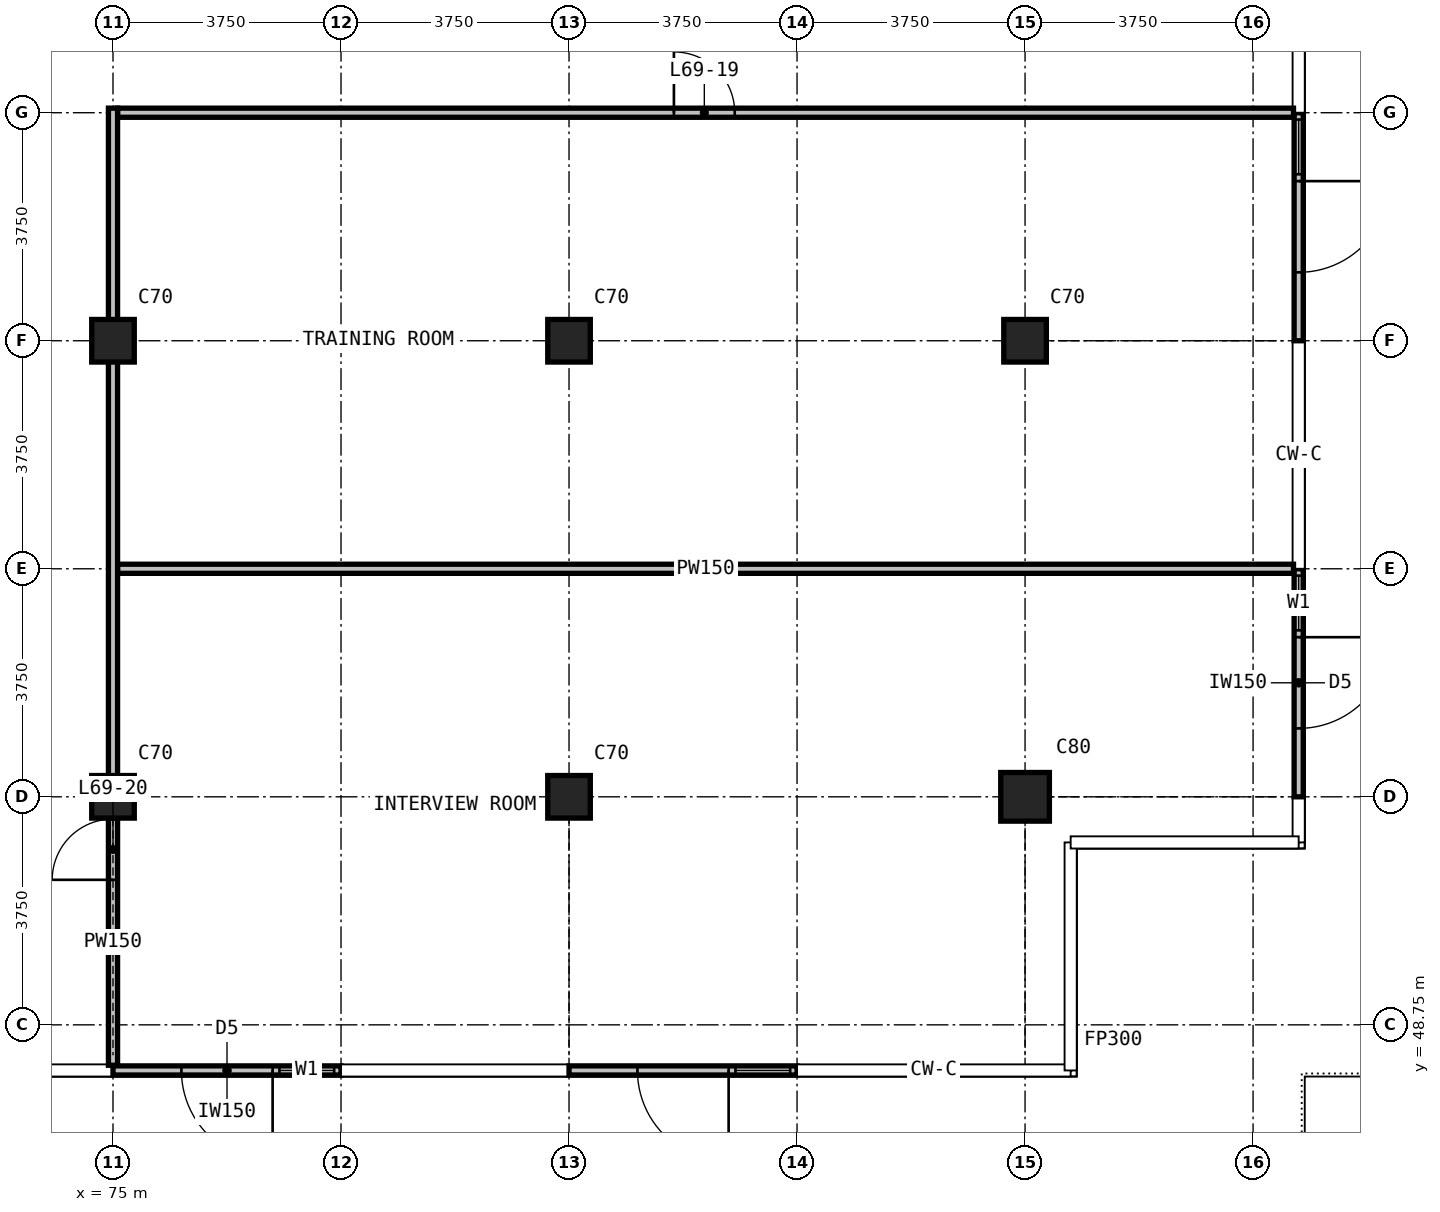
"""IFC4 building model, lengths in metres.
Left out: names, types, materials, properties, quantities, classifications, styles, units other than length and angle.
Written with IfcOpenShell. Run it as: python <this file> out.ifc"""

import sys

from ifc_helpers import new_model, si_unit, direction, frame, frame_2d, origin, origin_2d, place, context, subcontext, project, spatial, rectangle, extrude, element, fill, save


model = new_model("IFC4")
c1 = context("Model", 3, precision=1e-05, world=origin(), true_north=direction((0.0, 1.0)))
c2 = subcontext(c1, "Body", "Model", "MODEL_VIEW")
j1 = project(units=[si_unit("LENGTHUNIT", "METRE"), si_unit("PLANEANGLEUNIT", "RADIAN")], contexts=[c1])
p1 = place(None, origin())
s1 = spatial("IfcSite", under=j1, at=p1, CompositionType="ELEMENT")
p2 = place(p1, origin())
s2 = spatial("IfcBuilding", under=s1, at=p2, CompositionType="ELEMENT")
p3 = place(p2, frame((0.0, 0.0, 265.7)))
s3 = spatial("IfcBuildingStorey", under=s2, at=p3, CompositionType="ELEMENT", Elevation=265.7)
for number, where, z_axis, x_axis in (
    (1, (75.0, 52.5, 0.0), (0.0, 0.0, 1.0), (1.0, 0.0, 0.0)),
    (2, (75.0, 60.0, 0.0), (0.0, 0.0, 1.0), (1.0, 0.0, 0.0)),
    (3, (82.5, 52.5, 0.0), (0.0, 0.0, 1.0), (1.0, 0.0, 0.0)),
    (4, (82.5, 60.0, 0.0), (0.0, 0.0, 1.0), (1.0, 0.0, 0.0)),
):
    element("IfcColumn", number, at=place(p3, frame(where, z_axis=z_axis, x_axis=x_axis)), inside=s3, PredefinedType="COLUMN", context=c2, shape_type="SweptSolid", body=[
        extrude(rectangle(XDim=0.7, YDim=0.7, at=origin_2d()), origin(), (0.0, 0.0, 1.0), 3.6),
    ])
p4 = place(p3, frame((90.0, 52.5, 0.0), z_axis=(0.0, 0.0, 1.0), x_axis=(1.0, 0.0, 0.0)))
e5 = element("IfcColumn", 5, at=p4, inside=s3, PredefinedType="COLUMN", context=c2, shape_type="SweptSolid", body=[
    extrude(rectangle(XDim=0.8, YDim=0.8, at=origin_2d()), origin(), (0.0, 0.0, 1.0), 3.6),
])
p5 = place(p3, frame((90.0, 60.0, 0.0), z_axis=(0.0, 0.0, 1.0), x_axis=(1.0, 0.0, 0.0)))
e6 = element("IfcColumn", 6, at=p5, inside=s3, PredefinedType="COLUMN", context=c2, shape_type="SweptSolid", body=[
    extrude(rectangle(XDim=0.7, YDim=0.7, at=origin_2d()), origin(), (0.0, 0.0, 1.0), 3.6),
])
p6 = place(p3, frame((94.5, 56.25, 0.0), z_axis=(0.0, 0.0, 1.0), x_axis=(0.0, -1.0, 0.0)))
e7 = element("IfcWall", 7, at=p6, inside=s3, PredefinedType="SOLIDWALL", context=c2, shape_type="SweptSolid", body=[
    extrude(rectangle(XDim=3.75, YDim=0.15, at=frame_2d((1.875, 0.0))), origin(), (0.0, 0.0, 1.0), 3.3),
])
p7 = place(p6, frame((0.113, 0.0, 0.1)))
e8 = element("IfcOpeningElement", 8, at=p7, cuts=e7, PredefinedType="OPENING", context=c2, shape_type="SweptSolid", body=[
    extrude(rectangle(XDim=0.9, YDim=2.4, at=frame_2d((0.45, 1.2))), frame((0.0, 0.085, 0.0), z_axis=(0.0, -1.0, 0.0), x_axis=(1.0, 0.0, 0.0)), (0.0, 0.0, 1.0), 0.17),
])
p8 = place(p6, frame((1.125, 0.0, 0.0)))
e9 = element("IfcOpeningElement", 9, at=p8, cuts=e7, PredefinedType="OPENING", context=c2, shape_type="SweptSolid", body=[
    extrude(rectangle(XDim=1.5, YDim=2.4, at=frame_2d((0.75, 1.2))), frame((0.0, 0.085, 0.0), z_axis=(0.0, -1.0, 0.0), x_axis=(1.0, 0.0, 0.0)), (0.0, 0.0, 1.0), 0.17),
])
p9 = place(p3, frame((94.5, 63.75, 0.0), z_axis=(0.0, 0.0, 1.0), x_axis=(0.0, -1.0, 0.0)))
e10 = element("IfcWall", 10, at=p9, inside=s3, PredefinedType="SOLIDWALL", context=c2, shape_type="SweptSolid", body=[
    extrude(rectangle(XDim=3.75, YDim=0.15, at=frame_2d((1.875, 0.0))), origin(), (0.0, 0.0, 1.0), 3.3),
])
p10 = place(p9, frame((0.113, 0.0, 0.1)))
e11 = element("IfcOpeningElement", 11, at=p10, cuts=e10, PredefinedType="OPENING", context=c2, shape_type="SweptSolid", body=[
    extrude(rectangle(XDim=0.9, YDim=2.4, at=frame_2d((0.45, 1.2))), frame((0.0, 0.085, 0.0), z_axis=(0.0, -1.0, 0.0), x_axis=(1.0, 0.0, 0.0)), (0.0, 0.0, 1.0), 0.17),
])
p11 = place(p9, frame((1.125, 0.0, 0.0)))
e12 = element("IfcOpeningElement", 12, at=p11, cuts=e10, PredefinedType="OPENING", context=c2, shape_type="SweptSolid", body=[
    extrude(rectangle(XDim=1.5, YDim=2.4, at=frame_2d((0.75, 1.2))), frame((0.0, 0.085, 0.0), z_axis=(0.0, -1.0, 0.0), x_axis=(1.0, 0.0, 0.0)), (0.0, 0.0, 1.0), 0.17),
])
p12 = place(p3, frame((78.75, 48.0, 0.0), z_axis=(0.0, 0.0, 1.0), x_axis=(-1.0, 0.0, 0.0)))
e13 = element("IfcWall", 13, at=p12, inside=s3, PredefinedType="SOLIDWALL", context=c2, shape_type="SweptSolid", body=[
    extrude(rectangle(XDim=3.75, YDim=0.15, at=frame_2d((1.875, 0.0))), origin(), (0.0, 0.0, 1.0), 3.3),
])
p13 = place(p12, frame((0.113, 0.0, 0.1)))
e14 = element("IfcOpeningElement", 14, at=p13, cuts=e13, PredefinedType="OPENING", context=c2, shape_type="SweptSolid", body=[
    extrude(rectangle(XDim=0.9, YDim=2.4, at=frame_2d((0.45, 1.2))), frame((0.0, 0.085, 0.0), z_axis=(0.0, -1.0, 0.0), x_axis=(1.0, 0.0, 0.0)), (0.0, 0.0, 1.0), 0.17),
])
p14 = place(p12, frame((1.125, 0.0, 0.0)))
e15 = element("IfcOpeningElement", 15, at=p14, cuts=e13, PredefinedType="OPENING", context=c2, shape_type="SweptSolid", body=[
    extrude(rectangle(XDim=1.5, YDim=2.4, at=frame_2d((0.75, 1.2))), frame((0.0, 0.085, 0.0), z_axis=(0.0, -1.0, 0.0), x_axis=(1.0, 0.0, 0.0)), (0.0, 0.0, 1.0), 0.17),
])
p15 = place(p3, frame((86.25, 48.0, 0.0), z_axis=(0.0, 0.0, 1.0), x_axis=(-1.0, 0.0, 0.0)))
e16 = element("IfcWall", 16, at=p15, inside=s3, PredefinedType="SOLIDWALL", context=c2, shape_type="SweptSolid", body=[
    extrude(rectangle(XDim=3.75, YDim=0.15, at=frame_2d((1.875, 0.0))), origin(), (0.0, 0.0, 1.0), 3.3),
])
p16 = place(p15, frame((0.113, 0.0, 0.1)))
e17 = element("IfcOpeningElement", 17, at=p16, cuts=e16, PredefinedType="OPENING", context=c2, shape_type="SweptSolid", body=[
    extrude(rectangle(XDim=0.9, YDim=2.4, at=frame_2d((0.45, 1.2))), frame((0.0, 0.085, 0.0), z_axis=(0.0, -1.0, 0.0), x_axis=(1.0, 0.0, 0.0)), (0.0, 0.0, 1.0), 0.17),
])
p17 = place(p15, frame((1.125, 0.0, 0.0)))
e18 = element("IfcOpeningElement", 18, at=p17, cuts=e16, PredefinedType="OPENING", context=c2, shape_type="SweptSolid", body=[
    extrude(rectangle(XDim=1.5, YDim=2.4, at=frame_2d((0.75, 1.2))), frame((0.0, 0.085, 0.0), z_axis=(0.0, -1.0, 0.0), x_axis=(1.0, 0.0, 0.0)), (0.0, 0.0, 1.0), 0.17),
])
p18 = place(p3, frame((75.075, 56.25, 0.0), z_axis=(0.0, 0.0, 1.0), x_axis=(1.0, 0.0, 0.0)))
e19 = element("IfcWall", 19, at=p18, inside=s3, PredefinedType="PARTITIONING", context=c2, shape_type="SweptSolid", body=[
    extrude(rectangle(XDim=19.34, YDim=0.15, at=frame_2d((9.67, 0.0))), origin(), (0.0, 0.0, 1.0), 3.3),
])
p19 = place(p3, frame((75.075, 63.75, 0.0), z_axis=(0.0, 0.0, 1.0), x_axis=(1.0, 0.0, 0.0)))
e20 = element("IfcWall", 20, at=p19, inside=s3, PredefinedType="PARTITIONING", context=c2, shape_type="SweptSolid", body=[
    extrude(rectangle(XDim=19.34, YDim=0.15, at=frame_2d((9.67, 0.0))), origin(), (0.0, 0.0, 1.0), 3.3),
])
p20 = place(p19, frame((9.15, 0.0, 0.0)))
e21 = element("IfcOpeningElement", 21, at=p20, cuts=e20, PredefinedType="OPENING", context=c2, shape_type="SweptSolid", body=[
    extrude(rectangle(XDim=1.0, YDim=2.2, at=frame_2d((0.5, 1.1))), frame((0.0, 0.085, 0.0), z_axis=(0.0, -1.0, 0.0), x_axis=(1.0, 0.0, 0.0)), (0.0, 0.0, 1.0), 0.17),
])
p21 = place(p3, frame((75.0, 48.085, 0.0), z_axis=(0.0, 0.0, 1.0), x_axis=(0.0, 1.0, 0.0)))
e22 = element("IfcWall", 22, at=p21, inside=s3, PredefinedType="PARTITIONING", context=c2, shape_type="SweptSolid", body=[
    extrude(rectangle(XDim=4.065, YDim=0.15, at=frame_2d((2.032, 0.0))), origin(), (0.0, 0.0, 1.0), 2.5),
])
p22 = place(p21, frame((3.05, 0.0, 0.0)))
e23 = element("IfcOpeningElement", 23, at=p22, cuts=e22, PredefinedType="OPENING", context=c2, shape_type="SweptSolid", body=[
    extrude(rectangle(XDim=1.0, YDim=2.2, at=frame_2d((0.5, 1.1))), frame((0.0, 0.085, 0.0), z_axis=(0.0, -1.0, 0.0), x_axis=(1.0, 0.0, 0.0)), (0.0, 0.0, 1.0), 0.17),
])
p23 = place(p3, frame((75.0, 52.15, 0.0), z_axis=(0.0, 0.0, 1.0), x_axis=(0.0, 1.0, 0.0)))
e24 = element("IfcWall", 24, at=p23, inside=s3, PredefinedType="PARTITIONING", context=c2, shape_type="SweptSolid", body=[
    extrude(rectangle(XDim=11.675, YDim=0.15, at=frame_2d((5.837, 0.0))), origin(), (0.0, 0.0, 1.0), 3.3),
])
p24 = place(p7, origin())
e25 = element("IfcWindow", 25, at=p24, inside=s3, PartitioningType="SINGLE_PANEL", PredefinedType="WINDOW", context=c2, shape_type="SweptSolid", body=[
    extrude(rectangle(XDim=0.9, YDim=2.4, at=frame_2d((0.45, 1.2))), frame((0.0, 0.03, 0.0), z_axis=(0.0, -1.0, 0.0), x_axis=(1.0, 0.0, 0.0)), (0.0, 0.0, 1.0), 0.06),
])
fill(e8, e25)
p25 = place(p8, origin())
e26 = element("IfcDoor", 26, at=p25, inside=s3, OperationType="DOUBLE_DOOR_SINGLE_SWING", PredefinedType="DOOR", context=c2, shape_type="SweptSolid", body=[
    extrude(rectangle(XDim=1.5, YDim=2.4, at=frame_2d((0.75, 1.2))), frame((0.0, 0.025, 0.0), z_axis=(0.0, -1.0, 0.0), x_axis=(1.0, 0.0, 0.0)), (0.0, 0.0, 1.0), 0.05),
])
fill(e9, e26)
p26 = place(p10, origin())
e27 = element("IfcWindow", 27, at=p26, inside=s3, PartitioningType="SINGLE_PANEL", PredefinedType="WINDOW", context=c2, shape_type="SweptSolid", body=[
    extrude(rectangle(XDim=0.9, YDim=2.4, at=frame_2d((0.45, 1.2))), frame((0.0, 0.03, 0.0), z_axis=(0.0, -1.0, 0.0), x_axis=(1.0, 0.0, 0.0)), (0.0, 0.0, 1.0), 0.06),
])
fill(e11, e27)
p27 = place(p11, origin())
e28 = element("IfcDoor", 28, at=p27, inside=s3, OperationType="DOUBLE_DOOR_SINGLE_SWING", PredefinedType="DOOR", context=c2, shape_type="SweptSolid", body=[
    extrude(rectangle(XDim=1.5, YDim=2.4, at=frame_2d((0.75, 1.2))), frame((0.0, 0.025, 0.0), z_axis=(0.0, -1.0, 0.0), x_axis=(1.0, 0.0, 0.0)), (0.0, 0.0, 1.0), 0.05),
])
fill(e12, e28)
p28 = place(p13, origin())
e29 = element("IfcWindow", 29, at=p28, inside=s3, PartitioningType="SINGLE_PANEL", PredefinedType="WINDOW", context=c2, shape_type="SweptSolid", body=[
    extrude(rectangle(XDim=0.9, YDim=2.4, at=frame_2d((0.45, 1.2))), frame((0.0, 0.03, 0.0), z_axis=(0.0, -1.0, 0.0), x_axis=(1.0, 0.0, 0.0)), (0.0, 0.0, 1.0), 0.06),
])
fill(e14, e29)
p29 = place(p14, origin())
e30 = element("IfcDoor", 30, at=p29, inside=s3, OperationType="DOUBLE_DOOR_SINGLE_SWING", PredefinedType="DOOR", context=c2, shape_type="SweptSolid", body=[
    extrude(rectangle(XDim=1.5, YDim=2.4, at=frame_2d((0.75, 1.2))), frame((0.0, 0.025, 0.0), z_axis=(0.0, -1.0, 0.0), x_axis=(1.0, 0.0, 0.0)), (0.0, 0.0, 1.0), 0.05),
])
fill(e15, e30)
p30 = place(p16, origin())
e31 = element("IfcWindow", 31, at=p30, inside=s3, PartitioningType="SINGLE_PANEL", PredefinedType="WINDOW", context=c2, shape_type="SweptSolid", body=[
    extrude(rectangle(XDim=0.9, YDim=2.4, at=frame_2d((0.45, 1.2))), frame((0.0, 0.03, 0.0), z_axis=(0.0, -1.0, 0.0), x_axis=(1.0, 0.0, 0.0)), (0.0, 0.0, 1.0), 0.06),
])
fill(e17, e31)
p31 = place(p17, origin())
e32 = element("IfcDoor", 32, at=p31, inside=s3, OperationType="DOUBLE_DOOR_SINGLE_SWING", PredefinedType="DOOR", context=c2, shape_type="SweptSolid", body=[
    extrude(rectangle(XDim=1.5, YDim=2.4, at=frame_2d((0.75, 1.2))), frame((0.0, 0.025, 0.0), z_axis=(0.0, -1.0, 0.0), x_axis=(1.0, 0.0, 0.0)), (0.0, 0.0, 1.0), 0.05),
])
fill(e18, e32)
p32 = place(p20, origin())
e33 = element("IfcDoor", 33, at=p32, inside=s3, OperationType="SINGLE_SWING_LEFT", PredefinedType="DOOR", context=c2, shape_type="SweptSolid", body=[
    extrude(rectangle(XDim=1.0, YDim=2.2, at=frame_2d((0.5, 1.1))), frame((0.0, 0.025, 0.0), z_axis=(0.0, -1.0, 0.0), x_axis=(1.0, 0.0, 0.0)), (0.0, 0.0, 1.0), 0.05),
])
fill(e21, e33)
p33 = place(p22, origin())
e34 = element("IfcDoor", 34, at=p33, inside=s3, OperationType="SINGLE_SWING_LEFT", PredefinedType="DOOR", context=c2, shape_type="SweptSolid", body=[
    extrude(rectangle(XDim=1.0, YDim=2.2, at=frame_2d((0.5, 1.1))), frame((0.0, 0.025, 0.0), z_axis=(0.0, -1.0, 0.0), x_axis=(1.0, 0.0, 0.0)), (0.0, 0.0, 1.0), 0.05),
])
fill(e23, e34)
save(model, sys.argv[1])
